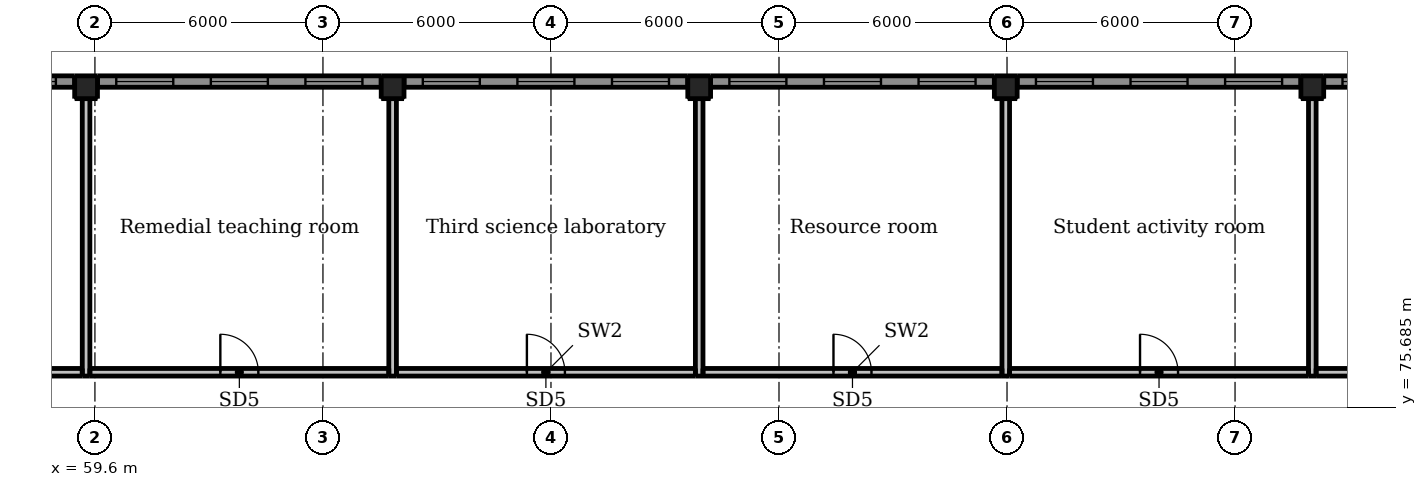
"""IFC4 building model, lengths in metres.
Left out: names, types, materials, properties, quantities, classifications, styles, units other than length and angle.
Written with IfcOpenShell. Run it as: python <this file> out.ifc"""

import sys

from ifc_helpers import new_model, si_unit, direction, frame, frame_2d, origin, origin_2d, place, context, subcontext, project, spatial, rectangle, extrude, element, fill, save


model = new_model("IFC4")
c1 = context("Model", 3, precision=1e-05, world=origin(), true_north=direction((0.0, 1.0)))
c2 = subcontext(c1, "Body", "Model", "MODEL_VIEW")
j1 = project(units=[si_unit("LENGTHUNIT", "METRE"), si_unit("PLANEANGLEUNIT", "RADIAN")], contexts=[c1])
p1 = place(None, origin())
s1 = spatial("IfcSite", under=j1, at=p1, CompositionType="ELEMENT")
p2 = place(p1, origin())
s2 = spatial("IfcBuilding", under=s1, at=p2, CompositionType="ELEMENT")
p3 = place(p2, frame((0.0, 0.0, 14.5)))
s3 = spatial("IfcBuildingStorey", under=s2, at=p3, CompositionType="ELEMENT", Elevation=14.5)
for number, where, z_axis, x_axis in (
    (1, (59.367, 84.1, -0.3), (0.0, 0.0, 1.0), (1.0, 0.0, 0.0)),
    (2, (67.433, 84.1, -0.3), (0.0, 0.0, 1.0), (1.0, 0.0, 0.0)),
    (3, (75.5, 84.1, -0.3), (0.0, 0.0, 1.0), (1.0, 0.0, 0.0)),
    (4, (83.567, 84.1, -0.3), (0.0, 0.0, 1.0), (1.0, 0.0, 0.0)),
    (5, (91.633, 84.1, -0.3), (0.0, 0.0, 1.0), (1.0, 0.0, 0.0)),
):
    element("IfcColumn", number, at=place(p3, frame(where, z_axis=z_axis, x_axis=x_axis)), inside=s3, PredefinedType="COLUMN", context=c2, shape_type="SweptSolid", body=[
        extrude(rectangle(XDim=0.6, YDim=0.6, at=origin_2d()), origin(), (0.0, 0.0, 1.0), 4.5),
    ])
p4 = place(p3, frame((51.6, 84.25, 0.0), z_axis=(0.0, 0.0, 1.0), x_axis=(1.0, 0.0, 0.0)))
e6 = element("IfcWall", 6, at=p4, inside=s3, PredefinedType="SOLIDWALL", context=c2, shape_type="SweptSolid", body=[
    extrude(rectangle(XDim=7.467, YDim=0.3, at=frame_2d((3.733, 0.0))), origin(), (0.0, 0.0, 1.0), 3.3),
])
p5 = place(p4, frame((0.494, 0.0, 0.9)))
e7 = element("IfcOpeningElement", 7, at=p5, cuts=e6, PredefinedType="OPENING", context=c2, shape_type="SweptSolid", body=[
    extrude(rectangle(XDim=1.5, YDim=1.5, at=frame_2d((0.75, 0.75))), frame((0.0, 0.16, 0.0), z_axis=(0.0, -1.0, 0.0), x_axis=(1.0, 0.0, 0.0)), (0.0, 0.0, 1.0), 0.32),
])
p6 = place(p4, frame((2.983, 0.0, 0.9)))
e8 = element("IfcOpeningElement", 8, at=p6, cuts=e6, PredefinedType="OPENING", context=c2, shape_type="SweptSolid", body=[
    extrude(rectangle(XDim=1.5, YDim=1.5, at=frame_2d((0.75, 0.75))), frame((0.0, 0.16, 0.0), z_axis=(0.0, -1.0, 0.0), x_axis=(1.0, 0.0, 0.0)), (0.0, 0.0, 1.0), 0.32),
])
p7 = place(p4, frame((5.472, 0.0, 0.9)))
e9 = element("IfcOpeningElement", 9, at=p7, cuts=e6, PredefinedType="OPENING", context=c2, shape_type="SweptSolid", body=[
    extrude(rectangle(XDim=1.5, YDim=1.5, at=frame_2d((0.75, 0.75))), frame((0.0, 0.16, 0.0), z_axis=(0.0, -1.0, 0.0), x_axis=(1.0, 0.0, 0.0)), (0.0, 0.0, 1.0), 0.32),
])
p8 = place(p3, frame((59.667, 84.25, 0.0), z_axis=(0.0, 0.0, 1.0), x_axis=(1.0, 0.0, 0.0)))
e10 = element("IfcWall", 10, at=p8, inside=s3, PredefinedType="SOLIDWALL", context=c2, shape_type="SweptSolid", body=[
    extrude(rectangle(XDim=7.466, YDim=0.3, at=frame_2d((3.733, 0.0))), origin(), (0.0, 0.0, 1.0), 3.3),
])
p9 = place(p8, frame((0.494, 0.0, 0.9)))
e11 = element("IfcOpeningElement", 11, at=p9, cuts=e10, PredefinedType="OPENING", context=c2, shape_type="SweptSolid", body=[
    extrude(rectangle(XDim=1.5, YDim=1.5, at=frame_2d((0.75, 0.75))), frame((0.0, 0.16, 0.0), z_axis=(0.0, -1.0, 0.0), x_axis=(1.0, 0.0, 0.0)), (0.0, 0.0, 1.0), 0.32),
])
p10 = place(p8, frame((2.983, 0.0, 0.9)))
e12 = element("IfcOpeningElement", 12, at=p10, cuts=e10, PredefinedType="OPENING", context=c2, shape_type="SweptSolid", body=[
    extrude(rectangle(XDim=1.5, YDim=1.5, at=frame_2d((0.75, 0.75))), frame((0.0, 0.16, 0.0), z_axis=(0.0, -1.0, 0.0), x_axis=(1.0, 0.0, 0.0)), (0.0, 0.0, 1.0), 0.32),
])
p11 = place(p8, frame((5.472, 0.0, 0.9)))
e13 = element("IfcOpeningElement", 13, at=p11, cuts=e10, PredefinedType="OPENING", context=c2, shape_type="SweptSolid", body=[
    extrude(rectangle(XDim=1.5, YDim=1.5, at=frame_2d((0.75, 0.75))), frame((0.0, 0.16, 0.0), z_axis=(0.0, -1.0, 0.0), x_axis=(1.0, 0.0, 0.0)), (0.0, 0.0, 1.0), 0.32),
])
p12 = place(p3, frame((67.733, 84.25, 0.0), z_axis=(0.0, 0.0, 1.0), x_axis=(1.0, 0.0, 0.0)))
e14 = element("IfcWall", 14, at=p12, inside=s3, PredefinedType="SOLIDWALL", context=c2, shape_type="SweptSolid", body=[
    extrude(rectangle(XDim=7.467, YDim=0.3, at=frame_2d((3.733, 0.0))), origin(), (0.0, 0.0, 1.0), 3.3),
])
p13 = place(p12, frame((0.494, 0.0, 0.9)))
e15 = element("IfcOpeningElement", 15, at=p13, cuts=e14, PredefinedType="OPENING", context=c2, shape_type="SweptSolid", body=[
    extrude(rectangle(XDim=1.5, YDim=1.5, at=frame_2d((0.75, 0.75))), frame((0.0, 0.16, 0.0), z_axis=(0.0, -1.0, 0.0), x_axis=(1.0, 0.0, 0.0)), (0.0, 0.0, 1.0), 0.32),
])
p14 = place(p12, frame((2.983, 0.0, 0.9)))
e16 = element("IfcOpeningElement", 16, at=p14, cuts=e14, PredefinedType="OPENING", context=c2, shape_type="SweptSolid", body=[
    extrude(rectangle(XDim=1.5, YDim=1.5, at=frame_2d((0.75, 0.75))), frame((0.0, 0.16, 0.0), z_axis=(0.0, -1.0, 0.0), x_axis=(1.0, 0.0, 0.0)), (0.0, 0.0, 1.0), 0.32),
])
p15 = place(p12, frame((5.472, 0.0, 0.9)))
e17 = element("IfcOpeningElement", 17, at=p15, cuts=e14, PredefinedType="OPENING", context=c2, shape_type="SweptSolid", body=[
    extrude(rectangle(XDim=1.5, YDim=1.5, at=frame_2d((0.75, 0.75))), frame((0.0, 0.16, 0.0), z_axis=(0.0, -1.0, 0.0), x_axis=(1.0, 0.0, 0.0)), (0.0, 0.0, 1.0), 0.32),
])
p16 = place(p3, frame((75.8, 84.25, 0.0), z_axis=(0.0, 0.0, 1.0), x_axis=(1.0, 0.0, 0.0)))
e18 = element("IfcWall", 18, at=p16, inside=s3, PredefinedType="SOLIDWALL", context=c2, shape_type="SweptSolid", body=[
    extrude(rectangle(XDim=7.467, YDim=0.3, at=frame_2d((3.733, 0.0))), origin(), (0.0, 0.0, 1.0), 3.3),
])
p17 = place(p16, frame((0.494, 0.0, 0.9)))
e19 = element("IfcOpeningElement", 19, at=p17, cuts=e18, PredefinedType="OPENING", context=c2, shape_type="SweptSolid", body=[
    extrude(rectangle(XDim=1.5, YDim=1.5, at=frame_2d((0.75, 0.75))), frame((0.0, 0.16, 0.0), z_axis=(0.0, -1.0, 0.0), x_axis=(1.0, 0.0, 0.0)), (0.0, 0.0, 1.0), 0.32),
])
p18 = place(p16, frame((2.983, 0.0, 0.9)))
e20 = element("IfcOpeningElement", 20, at=p18, cuts=e18, PredefinedType="OPENING", context=c2, shape_type="SweptSolid", body=[
    extrude(rectangle(XDim=1.5, YDim=1.5, at=frame_2d((0.75, 0.75))), frame((0.0, 0.16, 0.0), z_axis=(0.0, -1.0, 0.0), x_axis=(1.0, 0.0, 0.0)), (0.0, 0.0, 1.0), 0.32),
])
p19 = place(p16, frame((5.472, 0.0, 0.9)))
e21 = element("IfcOpeningElement", 21, at=p19, cuts=e18, PredefinedType="OPENING", context=c2, shape_type="SweptSolid", body=[
    extrude(rectangle(XDim=1.5, YDim=1.5, at=frame_2d((0.75, 0.75))), frame((0.0, 0.16, 0.0), z_axis=(0.0, -1.0, 0.0), x_axis=(1.0, 0.0, 0.0)), (0.0, 0.0, 1.0), 0.32),
])
p20 = place(p3, frame((83.867, 84.25, 0.0), z_axis=(0.0, 0.0, 1.0), x_axis=(1.0, 0.0, 0.0)))
e22 = element("IfcWall", 22, at=p20, inside=s3, PredefinedType="SOLIDWALL", context=c2, shape_type="SweptSolid", body=[
    extrude(rectangle(XDim=7.466, YDim=0.3, at=frame_2d((3.733, 0.0))), origin(), (0.0, 0.0, 1.0), 3.3),
])
p21 = place(p20, frame((0.494, 0.0, 0.9)))
e23 = element("IfcOpeningElement", 23, at=p21, cuts=e22, PredefinedType="OPENING", context=c2, shape_type="SweptSolid", body=[
    extrude(rectangle(XDim=1.5, YDim=1.5, at=frame_2d((0.75, 0.75))), frame((0.0, 0.16, 0.0), z_axis=(0.0, -1.0, 0.0), x_axis=(1.0, 0.0, 0.0)), (0.0, 0.0, 1.0), 0.32),
])
p22 = place(p20, frame((2.983, 0.0, 0.9)))
e24 = element("IfcOpeningElement", 24, at=p22, cuts=e22, PredefinedType="OPENING", context=c2, shape_type="SweptSolid", body=[
    extrude(rectangle(XDim=1.5, YDim=1.5, at=frame_2d((0.75, 0.75))), frame((0.0, 0.16, 0.0), z_axis=(0.0, -1.0, 0.0), x_axis=(1.0, 0.0, 0.0)), (0.0, 0.0, 1.0), 0.32),
])
p23 = place(p20, frame((5.472, 0.0, 0.9)))
e25 = element("IfcOpeningElement", 25, at=p23, cuts=e22, PredefinedType="OPENING", context=c2, shape_type="SweptSolid", body=[
    extrude(rectangle(XDim=1.5, YDim=1.5, at=frame_2d((0.75, 0.75))), frame((0.0, 0.16, 0.0), z_axis=(0.0, -1.0, 0.0), x_axis=(1.0, 0.0, 0.0)), (0.0, 0.0, 1.0), 0.32),
])
p24 = place(p3, frame((91.933, 84.25, 0.0), z_axis=(0.0, 0.0, 1.0), x_axis=(1.0, 0.0, 0.0)))
e26 = element("IfcWall", 26, at=p24, inside=s3, PredefinedType="SOLIDWALL", context=c2, shape_type="SweptSolid", body=[
    extrude(rectangle(XDim=7.467, YDim=0.3, at=frame_2d((3.733, 0.0))), origin(), (0.0, 0.0, 1.0), 3.3),
])
p25 = place(p24, frame((0.494, 0.0, 0.9)))
e27 = element("IfcOpeningElement", 27, at=p25, cuts=e26, PredefinedType="OPENING", context=c2, shape_type="SweptSolid", body=[
    extrude(rectangle(XDim=1.5, YDim=1.5, at=frame_2d((0.75, 0.75))), frame((0.0, 0.16, 0.0), z_axis=(0.0, -1.0, 0.0), x_axis=(1.0, 0.0, 0.0)), (0.0, 0.0, 1.0), 0.32),
])
p26 = place(p24, frame((2.983, 0.0, 0.9)))
e28 = element("IfcOpeningElement", 28, at=p26, cuts=e26, PredefinedType="OPENING", context=c2, shape_type="SweptSolid", body=[
    extrude(rectangle(XDim=1.5, YDim=1.5, at=frame_2d((0.75, 0.75))), frame((0.0, 0.16, 0.0), z_axis=(0.0, -1.0, 0.0), x_axis=(1.0, 0.0, 0.0)), (0.0, 0.0, 1.0), 0.32),
])
p27 = place(p24, frame((5.472, 0.0, 0.9)))
e29 = element("IfcOpeningElement", 29, at=p27, cuts=e26, PredefinedType="OPENING", context=c2, shape_type="SweptSolid", body=[
    extrude(rectangle(XDim=1.5, YDim=1.5, at=frame_2d((0.75, 0.75))), frame((0.0, 0.16, 0.0), z_axis=(0.0, -1.0, 0.0), x_axis=(1.0, 0.0, 0.0)), (0.0, 0.0, 1.0), 0.32),
])
p28 = place(p3, frame((51.6, 76.6, 0.0), z_axis=(0.0, 0.0, 1.0), x_axis=(1.0, 0.0, 0.0)))
e30 = element("IfcWall", 30, at=p28, inside=s3, PredefinedType="PARTITIONING", context=c2, shape_type="SweptSolid", body=[
    extrude(rectangle(XDim=7.667, YDim=0.2, at=frame_2d((3.833, 0.0))), origin(), (0.0, 0.0, 1.0), 3.1),
])
p29 = place(p28, frame((3.333, 0.0, 0.0)))
e31 = element("IfcOpeningElement", 31, at=p29, cuts=e30, PredefinedType="OPENING", context=c2, shape_type="SweptSolid", body=[
    extrude(rectangle(XDim=1.0, YDim=2.1, at=frame_2d((0.5, 1.05))), frame((0.0, 0.11, 0.0), z_axis=(0.0, -1.0, 0.0), x_axis=(1.0, 0.0, 0.0)), (0.0, 0.0, 1.0), 0.22),
])
p30 = place(p3, frame((59.467, 76.6, 0.0), z_axis=(0.0, 0.0, 1.0), x_axis=(1.0, 0.0, 0.0)))
e32 = element("IfcWall", 32, at=p30, inside=s3, PredefinedType="PARTITIONING", context=c2, shape_type="SweptSolid", body=[
    extrude(rectangle(XDim=7.866, YDim=0.2, at=frame_2d((3.933, 0.0))), origin(), (0.0, 0.0, 1.0), 3.1),
])
p31 = place(p30, frame((3.433, 0.0, 0.0)))
e33 = element("IfcOpeningElement", 33, at=p31, cuts=e32, PredefinedType="OPENING", context=c2, shape_type="SweptSolid", body=[
    extrude(rectangle(XDim=1.0, YDim=2.1, at=frame_2d((0.5, 1.05))), frame((0.0, 0.11, 0.0), z_axis=(0.0, -1.0, 0.0), x_axis=(1.0, 0.0, 0.0)), (0.0, 0.0, 1.0), 0.22),
])
p32 = place(p3, frame((67.533, 76.6, 0.0), z_axis=(0.0, 0.0, 1.0), x_axis=(1.0, 0.0, 0.0)))
e34 = element("IfcWall", 34, at=p32, inside=s3, PredefinedType="PARTITIONING", context=c2, shape_type="SweptSolid", body=[
    extrude(rectangle(XDim=7.867, YDim=0.2, at=frame_2d((3.934, 0.0))), origin(), (0.0, 0.0, 1.0), 3.1),
])
p33 = place(p32, frame((3.434, 0.0, 0.0)))
e35 = element("IfcOpeningElement", 35, at=p33, cuts=e34, PredefinedType="OPENING", context=c2, shape_type="SweptSolid", body=[
    extrude(rectangle(XDim=1.0, YDim=2.1, at=frame_2d((0.5, 1.05))), frame((0.0, 0.11, 0.0), z_axis=(0.0, -1.0, 0.0), x_axis=(1.0, 0.0, 0.0)), (0.0, 0.0, 1.0), 0.22),
])
p34 = place(p3, frame((75.6, 76.6, 0.0), z_axis=(0.0, 0.0, 1.0), x_axis=(1.0, 0.0, 0.0)))
e36 = element("IfcWall", 36, at=p34, inside=s3, PredefinedType="PARTITIONING", context=c2, shape_type="SweptSolid", body=[
    extrude(rectangle(XDim=7.867, YDim=0.2, at=frame_2d((3.934, 0.0))), origin(), (0.0, 0.0, 1.0), 3.1),
])
p35 = place(p34, frame((3.434, 0.0, 0.0)))
e37 = element("IfcOpeningElement", 37, at=p35, cuts=e36, PredefinedType="OPENING", context=c2, shape_type="SweptSolid", body=[
    extrude(rectangle(XDim=1.0, YDim=2.1, at=frame_2d((0.5, 1.05))), frame((0.0, 0.11, 0.0), z_axis=(0.0, -1.0, 0.0), x_axis=(1.0, 0.0, 0.0)), (0.0, 0.0, 1.0), 0.22),
])
p36 = place(p3, frame((83.667, 76.6, 0.0), z_axis=(0.0, 0.0, 1.0), x_axis=(1.0, 0.0, 0.0)))
e38 = element("IfcWall", 38, at=p36, inside=s3, PredefinedType="PARTITIONING", context=c2, shape_type="SweptSolid", body=[
    extrude(rectangle(XDim=7.866, YDim=0.2, at=frame_2d((3.933, 0.0))), origin(), (0.0, 0.0, 1.0), 3.1),
])
p37 = place(p36, frame((3.433, 0.0, 0.0)))
e39 = element("IfcOpeningElement", 39, at=p37, cuts=e38, PredefinedType="OPENING", context=c2, shape_type="SweptSolid", body=[
    extrude(rectangle(XDim=1.0, YDim=2.1, at=frame_2d((0.5, 1.05))), frame((0.0, 0.11, 0.0), z_axis=(0.0, -1.0, 0.0), x_axis=(1.0, 0.0, 0.0)), (0.0, 0.0, 1.0), 0.22),
])
p38 = place(p3, frame((91.733, 76.6, 0.0), z_axis=(0.0, 0.0, 1.0), x_axis=(1.0, 0.0, 0.0)))
e40 = element("IfcWall", 40, at=p38, inside=s3, PredefinedType="PARTITIONING", context=c2, shape_type="SweptSolid", body=[
    extrude(rectangle(XDim=7.867, YDim=0.2, at=frame_2d((3.934, 0.0))), origin(), (0.0, 0.0, 1.0), 3.1),
])
p39 = place(p38, frame((3.434, 0.0, 0.0)))
e41 = element("IfcOpeningElement", 41, at=p39, cuts=e40, PredefinedType="OPENING", context=c2, shape_type="SweptSolid", body=[
    extrude(rectangle(XDim=1.0, YDim=2.1, at=frame_2d((0.5, 1.05))), frame((0.0, 0.11, 0.0), z_axis=(0.0, -1.0, 0.0), x_axis=(1.0, 0.0, 0.0)), (0.0, 0.0, 1.0), 0.22),
])
for number, where, z_axis, x_axis in (
    (42, (59.367, 76.5, 0.0), (0.0, 0.0, 1.0), (0.0, 1.0, 0.0)),
    (43, (67.433, 76.5, 0.0), (0.0, 0.0, 1.0), (0.0, 1.0, 0.0)),
    (44, (75.5, 76.5, 0.0), (0.0, 0.0, 1.0), (0.0, 1.0, 0.0)),
    (45, (83.567, 76.5, 0.0), (0.0, 0.0, 1.0), (0.0, 1.0, 0.0)),
    (46, (91.633, 76.5, 0.0), (0.0, 0.0, 1.0), (0.0, 1.0, 0.0)),
):
    element("IfcWall", number, at=place(p3, frame(where, z_axis=z_axis, x_axis=x_axis)), inside=s3, PredefinedType="PARTITIONING", context=c2, shape_type="SweptSolid", body=[
        extrude(rectangle(XDim=7.3, YDim=0.2, at=frame_2d((3.65, 0.0))), origin(), (0.0, 0.0, 1.0), 3.1),
    ])
p40 = place(p7, origin())
e47 = element("IfcWindow", 47, at=p40, inside=s3, PartitioningType="DOUBLE_PANEL_HORIZONTAL", PredefinedType="WINDOW", context=c2, shape_type="SweptSolid", body=[
    extrude(rectangle(XDim=1.5, YDim=1.5, at=frame_2d((0.75, 0.75))), frame((0.0, 0.03, 0.0), z_axis=(0.0, -1.0, 0.0), x_axis=(1.0, 0.0, 0.0)), (0.0, 0.0, 1.0), 0.06),
])
fill(e9, e47)
p41 = place(p9, origin())
e48 = element("IfcWindow", 48, at=p41, inside=s3, PartitioningType="DOUBLE_PANEL_HORIZONTAL", PredefinedType="WINDOW", context=c2, shape_type="SweptSolid", body=[
    extrude(rectangle(XDim=1.5, YDim=1.5, at=frame_2d((0.75, 0.75))), frame((0.0, 0.03, 0.0), z_axis=(0.0, -1.0, 0.0), x_axis=(1.0, 0.0, 0.0)), (0.0, 0.0, 1.0), 0.06),
])
fill(e11, e48)
p42 = place(p10, origin())
e49 = element("IfcWindow", 49, at=p42, inside=s3, PartitioningType="DOUBLE_PANEL_HORIZONTAL", PredefinedType="WINDOW", context=c2, shape_type="SweptSolid", body=[
    extrude(rectangle(XDim=1.5, YDim=1.5, at=frame_2d((0.75, 0.75))), frame((0.0, 0.03, 0.0), z_axis=(0.0, -1.0, 0.0), x_axis=(1.0, 0.0, 0.0)), (0.0, 0.0, 1.0), 0.06),
])
fill(e12, e49)
p43 = place(p11, origin())
e50 = element("IfcWindow", 50, at=p43, inside=s3, PartitioningType="DOUBLE_PANEL_HORIZONTAL", PredefinedType="WINDOW", context=c2, shape_type="SweptSolid", body=[
    extrude(rectangle(XDim=1.5, YDim=1.5, at=frame_2d((0.75, 0.75))), frame((0.0, 0.03, 0.0), z_axis=(0.0, -1.0, 0.0), x_axis=(1.0, 0.0, 0.0)), (0.0, 0.0, 1.0), 0.06),
])
fill(e13, e50)
p44 = place(p13, origin())
e51 = element("IfcWindow", 51, at=p44, inside=s3, PartitioningType="DOUBLE_PANEL_HORIZONTAL", PredefinedType="WINDOW", context=c2, shape_type="SweptSolid", body=[
    extrude(rectangle(XDim=1.5, YDim=1.5, at=frame_2d((0.75, 0.75))), frame((0.0, 0.03, 0.0), z_axis=(0.0, -1.0, 0.0), x_axis=(1.0, 0.0, 0.0)), (0.0, 0.0, 1.0), 0.06),
])
fill(e15, e51)
p45 = place(p14, origin())
e52 = element("IfcWindow", 52, at=p45, inside=s3, PartitioningType="DOUBLE_PANEL_HORIZONTAL", PredefinedType="WINDOW", context=c2, shape_type="SweptSolid", body=[
    extrude(rectangle(XDim=1.5, YDim=1.5, at=frame_2d((0.75, 0.75))), frame((0.0, 0.03, 0.0), z_axis=(0.0, -1.0, 0.0), x_axis=(1.0, 0.0, 0.0)), (0.0, 0.0, 1.0), 0.06),
])
fill(e16, e52)
p46 = place(p15, origin())
e53 = element("IfcWindow", 53, at=p46, inside=s3, PartitioningType="DOUBLE_PANEL_HORIZONTAL", PredefinedType="WINDOW", context=c2, shape_type="SweptSolid", body=[
    extrude(rectangle(XDim=1.5, YDim=1.5, at=frame_2d((0.75, 0.75))), frame((0.0, 0.03, 0.0), z_axis=(0.0, -1.0, 0.0), x_axis=(1.0, 0.0, 0.0)), (0.0, 0.0, 1.0), 0.06),
])
fill(e17, e53)
p47 = place(p17, origin())
e54 = element("IfcWindow", 54, at=p47, inside=s3, PartitioningType="DOUBLE_PANEL_HORIZONTAL", PredefinedType="WINDOW", context=c2, shape_type="SweptSolid", body=[
    extrude(rectangle(XDim=1.5, YDim=1.5, at=frame_2d((0.75, 0.75))), frame((0.0, 0.03, 0.0), z_axis=(0.0, -1.0, 0.0), x_axis=(1.0, 0.0, 0.0)), (0.0, 0.0, 1.0), 0.06),
])
fill(e19, e54)
p48 = place(p18, origin())
e55 = element("IfcWindow", 55, at=p48, inside=s3, PartitioningType="DOUBLE_PANEL_HORIZONTAL", PredefinedType="WINDOW", context=c2, shape_type="SweptSolid", body=[
    extrude(rectangle(XDim=1.5, YDim=1.5, at=frame_2d((0.75, 0.75))), frame((0.0, 0.03, 0.0), z_axis=(0.0, -1.0, 0.0), x_axis=(1.0, 0.0, 0.0)), (0.0, 0.0, 1.0), 0.06),
])
fill(e20, e55)
p49 = place(p19, origin())
e56 = element("IfcWindow", 56, at=p49, inside=s3, PartitioningType="DOUBLE_PANEL_HORIZONTAL", PredefinedType="WINDOW", context=c2, shape_type="SweptSolid", body=[
    extrude(rectangle(XDim=1.5, YDim=1.5, at=frame_2d((0.75, 0.75))), frame((0.0, 0.03, 0.0), z_axis=(0.0, -1.0, 0.0), x_axis=(1.0, 0.0, 0.0)), (0.0, 0.0, 1.0), 0.06),
])
fill(e21, e56)
p50 = place(p21, origin())
e57 = element("IfcWindow", 57, at=p50, inside=s3, PartitioningType="DOUBLE_PANEL_HORIZONTAL", PredefinedType="WINDOW", context=c2, shape_type="SweptSolid", body=[
    extrude(rectangle(XDim=1.5, YDim=1.5, at=frame_2d((0.75, 0.75))), frame((0.0, 0.03, 0.0), z_axis=(0.0, -1.0, 0.0), x_axis=(1.0, 0.0, 0.0)), (0.0, 0.0, 1.0), 0.06),
])
fill(e23, e57)
p51 = place(p22, origin())
e58 = element("IfcWindow", 58, at=p51, inside=s3, PartitioningType="DOUBLE_PANEL_HORIZONTAL", PredefinedType="WINDOW", context=c2, shape_type="SweptSolid", body=[
    extrude(rectangle(XDim=1.5, YDim=1.5, at=frame_2d((0.75, 0.75))), frame((0.0, 0.03, 0.0), z_axis=(0.0, -1.0, 0.0), x_axis=(1.0, 0.0, 0.0)), (0.0, 0.0, 1.0), 0.06),
])
fill(e24, e58)
p52 = place(p23, origin())
e59 = element("IfcWindow", 59, at=p52, inside=s3, PartitioningType="DOUBLE_PANEL_HORIZONTAL", PredefinedType="WINDOW", context=c2, shape_type="SweptSolid", body=[
    extrude(rectangle(XDim=1.5, YDim=1.5, at=frame_2d((0.75, 0.75))), frame((0.0, 0.03, 0.0), z_axis=(0.0, -1.0, 0.0), x_axis=(1.0, 0.0, 0.0)), (0.0, 0.0, 1.0), 0.06),
])
fill(e25, e59)
p53 = place(p25, origin())
e60 = element("IfcWindow", 60, at=p53, inside=s3, PartitioningType="DOUBLE_PANEL_HORIZONTAL", PredefinedType="WINDOW", context=c2, shape_type="SweptSolid", body=[
    extrude(rectangle(XDim=1.5, YDim=1.5, at=frame_2d((0.75, 0.75))), frame((0.0, 0.03, 0.0), z_axis=(0.0, -1.0, 0.0), x_axis=(1.0, 0.0, 0.0)), (0.0, 0.0, 1.0), 0.06),
])
fill(e27, e60)
p54 = place(p31, origin())
e61 = element("IfcDoor", 61, at=p54, inside=s3, OperationType="SINGLE_SWING_LEFT", PredefinedType="DOOR", context=c2, shape_type="SweptSolid", body=[
    extrude(rectangle(XDim=1.0, YDim=2.1, at=frame_2d((0.5, 1.05))), frame((0.0, 0.025, 0.0), z_axis=(0.0, -1.0, 0.0), x_axis=(1.0, 0.0, 0.0)), (0.0, 0.0, 1.0), 0.05),
])
fill(e33, e61)
p55 = place(p33, origin())
e62 = element("IfcDoor", 62, at=p55, inside=s3, OperationType="SINGLE_SWING_LEFT", PredefinedType="DOOR", context=c2, shape_type="SweptSolid", body=[
    extrude(rectangle(XDim=1.0, YDim=2.1, at=frame_2d((0.5, 1.05))), frame((0.0, 0.025, 0.0), z_axis=(0.0, -1.0, 0.0), x_axis=(1.0, 0.0, 0.0)), (0.0, 0.0, 1.0), 0.05),
])
fill(e35, e62)
p56 = place(p35, origin())
e63 = element("IfcDoor", 63, at=p56, inside=s3, OperationType="SINGLE_SWING_LEFT", PredefinedType="DOOR", context=c2, shape_type="SweptSolid", body=[
    extrude(rectangle(XDim=1.0, YDim=2.1, at=frame_2d((0.5, 1.05))), frame((0.0, 0.025, 0.0), z_axis=(0.0, -1.0, 0.0), x_axis=(1.0, 0.0, 0.0)), (0.0, 0.0, 1.0), 0.05),
])
fill(e37, e63)
p57 = place(p37, origin())
e64 = element("IfcDoor", 64, at=p57, inside=s3, OperationType="SINGLE_SWING_LEFT", PredefinedType="DOOR", context=c2, shape_type="SweptSolid", body=[
    extrude(rectangle(XDim=1.0, YDim=2.1, at=frame_2d((0.5, 1.05))), frame((0.0, 0.025, 0.0), z_axis=(0.0, -1.0, 0.0), x_axis=(1.0, 0.0, 0.0)), (0.0, 0.0, 1.0), 0.05),
])
fill(e39, e64)
save(model, sys.argv[1])
